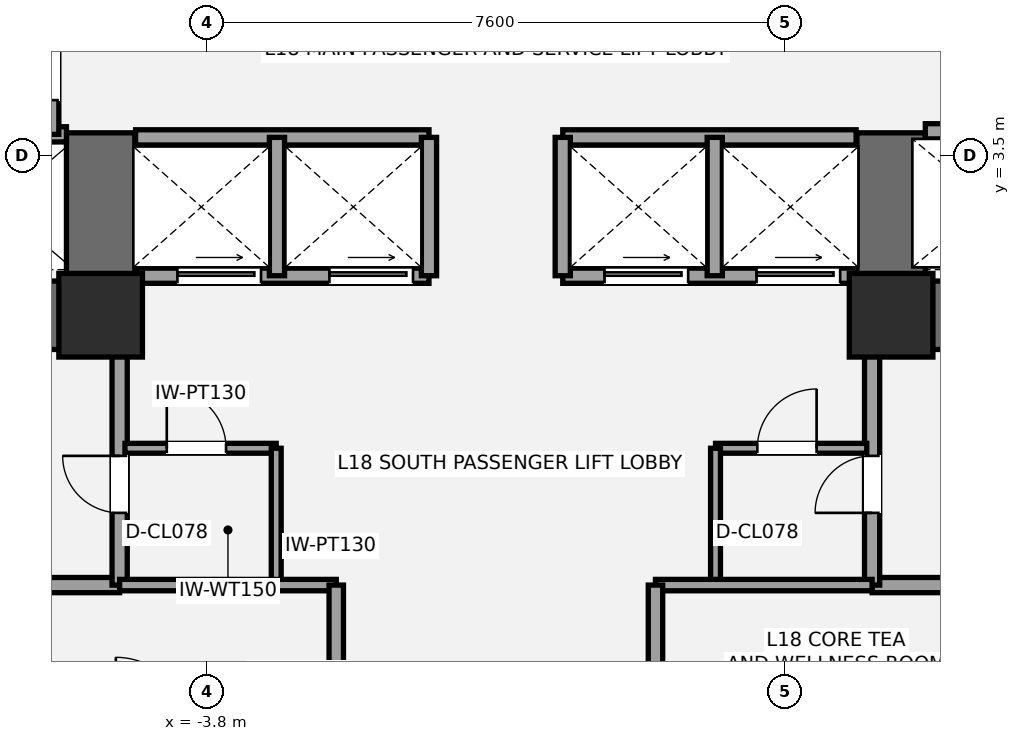
"""IFC4 building model, lengths in metres.
Left out: names, types, materials, properties, quantities, classifications, styles, units other than length and angle.
Written with IfcOpenShell. Run it as: python <this file> out.ifc"""

import sys

from ifc_helpers import new_model, si_unit, direction, frame, frame_2d, origin, origin_2d, place, context, subcontext, project, spatial, rectangle, extrude, element, fill, save


model = new_model("IFC4")
c1 = context("Model", 3, precision=1e-05, world=origin(), true_north=direction((0.0, 1.0)))
c2 = subcontext(c1, "Body", "Model", "MODEL_VIEW")
j1 = project(units=[si_unit("LENGTHUNIT", "METRE"), si_unit("PLANEANGLEUNIT", "RADIAN")], contexts=[c1])
p1 = place(None, origin())
s1 = spatial("IfcSite", under=j1, at=p1, CompositionType="ELEMENT")
p2 = place(p1, origin())
s2 = spatial("IfcBuilding", under=s1, at=p2, CompositionType="ELEMENT")
p3 = place(p2, frame((0.0, 0.0, 70.2)))
s3 = spatial("IfcBuildingStorey", under=s2, at=p3, CompositionType="ELEMENT", Elevation=70.2)
p4 = place(p3, frame((-4.75, 1.4, 0.0), z_axis=(0.0, 0.0, 1.0), x_axis=(-1.0, 0.0, 0.0)))
e1 = element("IfcWall", 1, at=p4, inside=s3, PredefinedType="SHEAR", context=c2, shape_type="SweptSolid", body=[
    extrude(rectangle(XDim=9.3, YDim=0.9, at=frame_2d((4.65, 0.0))), origin(), (0.0, 0.0, 1.0), 3.6),
])
p5 = place(p4, frame((5.55, 0.0, 0.0)))
e2 = element("IfcOpeningElement", 2, at=p5, cuts=e1, PredefinedType="OPENING", context=c2, shape_type="SweptSolid", body=[
    extrude(rectangle(XDim=1.05, YDim=2.15, at=frame_2d((0.525, 1.075))), frame((0.0, 0.46, 0.0), z_axis=(0.0, -1.0, 0.0), x_axis=(1.0, 0.0, 0.0)), (0.0, 0.0, 1.0), 0.92),
])
p6 = place(p4, frame((3.88, 0.0, 0.0)))
e3 = element("IfcOpeningElement", 3, at=p6, cuts=e1, PredefinedType="OPENING", context=c2, shape_type="SweptSolid", body=[
    extrude(rectangle(XDim=1.1, YDim=2.2, at=frame_2d((0.55, 1.1))), frame((0.0, 0.46, 0.0), z_axis=(0.0, -1.0, 0.0), x_axis=(1.0, 0.0, 0.0)), (0.0, 0.0, 1.0), 0.92),
])
p7 = place(p3, frame((-5.2, 0.95, 0.0), z_axis=(0.0, 0.0, 1.0), x_axis=(0.0, 1.0, 0.0)))
e4 = element("IfcWall", 4, at=p7, inside=s3, PredefinedType="SHEAR", context=c2, shape_type="SweptSolid", body=[
    extrude(rectangle(XDim=2.85, YDim=0.9, at=frame_2d((1.425, 0.0))), origin(), (0.0, 0.0, 1.0), 3.6),
])
p8 = place(p3, frame((14.05, 1.4, 0.0), z_axis=(0.0, 0.0, 1.0), x_axis=(-1.0, 0.0, 0.0)))
e5 = element("IfcWall", 5, at=p8, inside=s3, PredefinedType="SHEAR", context=c2, shape_type="SweptSolid", body=[
    extrude(rectangle(XDim=9.3, YDim=0.9, at=frame_2d((4.65, 0.0))), origin(), (0.0, 0.0, 1.0), 3.6),
])
p9 = place(p8, frame((2.7, 0.0, 0.0)))
e6 = element("IfcOpeningElement", 6, at=p9, cuts=e5, PredefinedType="OPENING", context=c2, shape_type="SweptSolid", body=[
    extrude(rectangle(XDim=1.05, YDim=2.15, at=frame_2d((0.525, 1.075))), frame((0.0, 0.46, 0.0), z_axis=(0.0, -1.0, 0.0), x_axis=(1.0, 0.0, 0.0)), (0.0, 0.0, 1.0), 0.92),
])
p10 = place(p8, frame((4.7, 0.0, 0.0)))
e7 = element("IfcOpeningElement", 7, at=p10, cuts=e5, PredefinedType="OPENING", context=c2, shape_type="SweptSolid", body=[
    extrude(rectangle(XDim=1.1, YDim=2.2, at=frame_2d((0.55, 1.1))), frame((0.0, 0.46, 0.0), z_axis=(0.0, -1.0, 0.0), x_axis=(1.0, 0.0, 0.0)), (0.0, 0.0, 1.0), 0.92),
])
p11 = place(p3, frame((5.2, 0.95, 0.0), z_axis=(0.0, 0.0, 1.0), x_axis=(0.0, 1.0, 0.0)))
e8 = element("IfcWall", 8, at=p11, inside=s3, PredefinedType="SHEAR", context=c2, shape_type="SweptSolid", body=[
    extrude(rectangle(XDim=2.85, YDim=0.9, at=frame_2d((1.425, 0.0))), origin(), (0.0, 0.0, 1.0), 3.6),
])
for number, where, z_axis, x_axis in (
    (9, (-5.2, 1.4, 0.0), (0.0, 0.0, 1.0), (1.0, 0.0, 0.0)),
    (10, (5.2, 1.4, 0.0), (0.0, 0.0, 1.0), (1.0, 0.0, 0.0)),
):
    element("IfcColumn", number, at=place(p3, frame(where, z_axis=z_axis, x_axis=x_axis)), inside=s3, PredefinedType="COLUMN", context=c2, shape_type="SweptSolid", body=[
        extrude(rectangle(XDim=1.1, YDim=1.1, at=origin_2d()), origin(), (0.0, 0.0, 1.0), 3.6),
    ])
p12 = place(p3, frame((-7.2, -2.15, 0.0), z_axis=(0.0, 0.0, 1.0), x_axis=(1.0, 0.0, 0.0)))
e11 = element("IfcWall", 11, at=p12, inside=s3, PredefinedType="SOLIDWALL", context=c2, shape_type="SweptSolid", body=[
    extrude(rectangle(XDim=2.25, YDim=0.2, at=frame_2d((1.125, 0.0))), origin(), (0.0, 0.0, 1.0), 3.4),
])
p13 = place(p3, frame((-4.95, -2.15, 0.0), z_axis=(0.0, 0.0, 1.0), x_axis=(0.0, 1.0, 0.0)))
e12 = element("IfcWall", 12, at=p13, inside=s3, PredefinedType="SOLIDWALL", context=c2, shape_type="SweptSolid", body=[
    extrude(rectangle(XDim=3.15, YDim=0.2, at=frame_2d((1.575, 0.0))), origin(), (0.0, 0.0, 1.0), 2.853),
])
p14 = place(p13, frame((0.95, 0.0, 0.0)))
e13 = element("IfcOpeningElement", 13, at=p14, cuts=e12, PredefinedType="OPENING", context=c2, shape_type="SweptSolid", body=[
    extrude(rectangle(XDim=0.75, YDim=2.1, at=frame_2d((0.375, 1.05))), frame((0.0, 0.11, 0.0), z_axis=(0.0, -1.0, 0.0), x_axis=(1.0, 0.0, 0.0)), (0.0, 0.0, 1.0), 0.22),
])
p15 = place(p3, frame((4.95, -2.15, 0.0), z_axis=(0.0, 0.0, 1.0), x_axis=(1.0, 0.0, 0.0)))
e14 = element("IfcWall", 14, at=p15, inside=s3, PredefinedType="SOLIDWALL", context=c2, shape_type="SweptSolid", body=[
    extrude(rectangle(XDim=2.25, YDim=0.2, at=frame_2d((1.125, 0.0))), origin(), (0.0, 0.0, 1.0), 3.4),
])
p16 = place(p3, frame((4.95, -2.15, 0.0), z_axis=(0.0, 0.0, 1.0), x_axis=(0.0, 1.0, 0.0)))
e15 = element("IfcWall", 15, at=p16, inside=s3, PredefinedType="SOLIDWALL", context=c2, shape_type="SweptSolid", body=[
    extrude(rectangle(XDim=3.15, YDim=0.2, at=frame_2d((1.575, 0.0))), origin(), (0.0, 0.0, 1.0), 2.853),
])
p17 = place(p16, frame((0.95, 0.0, 0.0)))
e16 = element("IfcOpeningElement", 16, at=p17, cuts=e15, PredefinedType="OPENING", context=c2, shape_type="SweptSolid", body=[
    extrude(rectangle(XDim=0.75, YDim=2.1, at=frame_2d((0.375, 1.05))), frame((0.0, 0.11, 0.0), z_axis=(0.0, -1.0, 0.0), x_axis=(1.0, 0.0, 0.0)), (0.0, 0.0, 1.0), 0.22),
])
p18 = place(p3, frame((-4.88, -0.35, 0.0), z_axis=(0.0, 0.0, 1.0), x_axis=(1.0, 0.0, 0.0)))
e17 = element("IfcWall", 17, at=p18, inside=s3, PredefinedType="PARTITIONING", context=c2, shape_type="SweptSolid", body=[
    extrude(rectangle(XDim=1.99, YDim=0.13, at=frame_2d((0.995, 0.0))), origin(), (0.0, 0.0, 1.0), 3.4),
])
p19 = place(p18, frame((0.55, 0.0, 0.0)))
e18 = element("IfcOpeningElement", 18, at=p19, cuts=e17, PredefinedType="OPENING", context=c2, shape_type="SweptSolid", body=[
    extrude(rectangle(XDim=0.78, YDim=2.1, at=frame_2d((0.39, 1.05))), frame((0.0, 0.075, 0.0), z_axis=(0.0, -1.0, 0.0), x_axis=(1.0, 0.0, 0.0)), (0.0, 0.0, 1.0), 0.15),
])
p20 = place(p3, frame((-2.89, -2.15, 0.0), z_axis=(0.0, 0.0, 1.0), x_axis=(0.0, 1.0, 0.0)))
e19 = element("IfcWall", 19, at=p20, inside=s3, PredefinedType="PARTITIONING", context=c2, shape_type="SweptSolid", body=[
    extrude(rectangle(XDim=1.8, YDim=0.13, at=frame_2d((0.9, 0.0))), origin(), (0.0, 0.0, 1.0), 3.4),
])
p21 = place(p3, frame((2.89, -0.35, 0.0), z_axis=(0.0, 0.0, 1.0), x_axis=(1.0, 0.0, 0.0)))
e20 = element("IfcWall", 20, at=p21, inside=s3, PredefinedType="PARTITIONING", context=c2, shape_type="SweptSolid", body=[
    extrude(rectangle(XDim=1.99, YDim=0.13, at=frame_2d((0.995, 0.0))), origin(), (0.0, 0.0, 1.0), 3.4),
])
p22 = place(p21, frame((0.55, 0.0, 0.0)))
e21 = element("IfcOpeningElement", 21, at=p22, cuts=e20, PredefinedType="OPENING", context=c2, shape_type="SweptSolid", body=[
    extrude(rectangle(XDim=0.78, YDim=2.1, at=frame_2d((0.39, 1.05))), frame((0.0, 0.075, 0.0), z_axis=(0.0, -1.0, 0.0), x_axis=(1.0, 0.0, 0.0)), (0.0, 0.0, 1.0), 0.15),
])
p23 = place(p3, frame((2.89, -2.15, 0.0), z_axis=(0.0, 0.0, 1.0), x_axis=(0.0, 1.0, 0.0)))
e22 = element("IfcWall", 22, at=p23, inside=s3, PredefinedType="PARTITIONING", context=c2, shape_type="SweptSolid", body=[
    extrude(rectangle(XDim=1.8, YDim=0.13, at=frame_2d((0.9, 0.0))), origin(), (0.0, 0.0, 1.0), 3.4),
])
p24 = place(p3, frame((-9.78, 3.78, 0.0), z_axis=(0.0, 0.0, 1.0), x_axis=(1.0, 0.0, 0.0)))
e23 = element("IfcWall", 23, at=p24, inside=s3, PredefinedType="SOLIDWALL", context=c2, shape_type="SweptSolid", body=[
    extrude(rectangle(XDim=4.13, YDim=0.2, at=frame_2d((2.065, 0.0))), origin(), (0.0, 0.0, 1.0), 3.4),
])
p25 = place(p3, frame((-5.85, 3.78, 0.0), z_axis=(0.0, 0.0, 1.0), x_axis=(0.0, 1.0, 0.0)))
e24 = element("IfcWall", 24, at=p25, inside=s3, PredefinedType="SOLIDWALL", context=c2, shape_type="SweptSolid", body=[
    extrude(rectangle(XDim=1.69, YDim=0.2, at=frame_2d((0.845, 0.0))), origin(), (0.0, 0.0, 1.0), 3.4),
])
p26 = place(p25, frame((0.45, 0.0, 0.0)))
e25 = element("IfcOpeningElement", 25, at=p26, cuts=e24, PredefinedType="OPENING", context=c2, shape_type="SweptSolid", body=[
    extrude(rectangle(XDim=0.75, YDim=2.1, at=frame_2d((0.375, 1.05))), frame((0.0, 0.11, 0.0), z_axis=(0.0, -1.0, 0.0), x_axis=(1.0, 0.0, 0.0)), (0.0, 0.0, 1.0), 0.22),
])
p27 = place(p3, frame((5.65, 3.82, 0.0), z_axis=(0.0, 0.0, 1.0), x_axis=(1.0, 0.0, 0.0)))
e26 = element("IfcWall", 26, at=p27, inside=s3, PredefinedType="SOLIDWALL", context=c2, shape_type="SweptSolid", body=[
    extrude(rectangle(XDim=4.13, YDim=0.2, at=frame_2d((2.065, 0.0))), origin(), (0.0, 0.0, 1.0), 3.4),
])
p28 = place(p27, frame((0.65, 0.0, 0.0)))
e27 = element("IfcOpeningElement", 27, at=p28, cuts=e26, PredefinedType="OPENING", context=c2, shape_type="SweptSolid", body=[
    extrude(rectangle(XDim=1.2, YDim=2.2, at=frame_2d((0.6, 1.1))), frame((0.0, 0.11, 0.0), z_axis=(0.0, -1.0, 0.0), x_axis=(1.0, 0.0, 0.0)), (0.0, 0.0, 1.0), 0.22),
])
p29 = place(p3, frame((-4.74, 1.92, 0.0), z_axis=(0.0, 0.0, 1.0), x_axis=(1.0, 0.0, 0.0)))
e28 = element("IfcWall", 28, at=p29, inside=s3, PredefinedType="SOLIDWALL", context=c2, shape_type="SweptSolid", body=[
    extrude(rectangle(XDim=3.86, YDim=0.2, at=frame_2d((1.93, 0.0))), origin(), (0.0, 0.0, 1.0), 2.39),
])
p30 = place(p29, frame((0.55, 0.0, 0.0)))
e29 = element("IfcOpeningElement", 29, at=p30, cuts=e28, PredefinedType="OPENING", context=c2, shape_type="SweptSolid", body=[
    extrude(rectangle(XDim=1.1, YDim=2.2, at=frame_2d((0.55, 1.1))), frame((0.0, 0.11, 0.0), z_axis=(0.0, -1.0, 0.0), x_axis=(1.0, 0.0, 0.0)), (0.0, 0.0, 1.0), 0.22),
])
p31 = place(p29, frame((2.55, 0.0, 0.0)))
e30 = element("IfcOpeningElement", 30, at=p31, cuts=e28, PredefinedType="OPENING", context=c2, shape_type="SweptSolid", body=[
    extrude(rectangle(XDim=1.1, YDim=2.2, at=frame_2d((0.55, 1.1))), frame((0.0, 0.11, 0.0), z_axis=(0.0, -1.0, 0.0), x_axis=(1.0, 0.0, 0.0)), (0.0, 0.0, 1.0), 0.22),
])
p32 = place(p3, frame((0.88, 1.92, 0.0), z_axis=(0.0, 0.0, 1.0), x_axis=(1.0, 0.0, 0.0)))
e31 = element("IfcWall", 31, at=p32, inside=s3, PredefinedType="SOLIDWALL", context=c2, shape_type="SweptSolid", body=[
    extrude(rectangle(XDim=3.86, YDim=0.2, at=frame_2d((1.93, 0.0))), origin(), (0.0, 0.0, 1.0), 2.39),
])
p33 = place(p32, frame((0.55, 0.0, 0.0)))
e32 = element("IfcOpeningElement", 32, at=p33, cuts=e31, PredefinedType="OPENING", context=c2, shape_type="SweptSolid", body=[
    extrude(rectangle(XDim=1.1, YDim=2.2, at=frame_2d((0.55, 1.1))), frame((0.0, 0.11, 0.0), z_axis=(0.0, -1.0, 0.0), x_axis=(1.0, 0.0, 0.0)), (0.0, 0.0, 1.0), 0.22),
])
p34 = place(p32, frame((2.55, 0.0, 0.0)))
e33 = element("IfcOpeningElement", 33, at=p34, cuts=e31, PredefinedType="OPENING", context=c2, shape_type="SweptSolid", body=[
    extrude(rectangle(XDim=1.1, YDim=2.2, at=frame_2d((0.55, 1.1))), frame((0.0, 0.11, 0.0), z_axis=(0.0, -1.0, 0.0), x_axis=(1.0, 0.0, 0.0)), (0.0, 0.0, 1.0), 0.22),
])
for number, where, z_axis, x_axis in (
    (34, (-4.74, 3.74, 0.0), (0.0, 0.0, 1.0), (1.0, 0.0, 0.0)),
    (35, (0.88, 3.74, 0.0), (0.0, 0.0, 1.0), (1.0, 0.0, 0.0)),
):
    element("IfcWall", number, at=place(p3, frame(where, z_axis=z_axis, x_axis=x_axis)), inside=s3, PredefinedType="SOLIDWALL", context=c2, shape_type="SweptSolid", body=[
        extrude(rectangle(XDim=3.86, YDim=0.2, at=frame_2d((1.93, 0.0))), origin(), (0.0, 0.0, 1.0), 3.4),
    ])
for number, where, z_axis, x_axis in (
    (36, (-2.88, 1.92, 0.0), (0.0, 0.0, 1.0), (0.0, 1.0, 0.0)),
    (37, (2.88, 1.92, 0.0), (0.0, 0.0, 1.0), (0.0, 1.0, 0.0)),
    (38, (-0.88, 1.92, 0.0), (0.0, 0.0, 1.0), (0.0, 1.0, 0.0)),
    (39, (0.88, 1.92, 0.0), (0.0, 0.0, 1.0), (0.0, 1.0, 0.0)),
):
    element("IfcWall", number, at=place(p3, frame(where, z_axis=z_axis, x_axis=x_axis)), inside=s3, PredefinedType="SOLIDWALL", context=c2, shape_type="SweptSolid", body=[
        extrude(rectangle(XDim=1.82, YDim=0.2, at=frame_2d((0.91, 0.0))), origin(), (0.0, 0.0, 1.0), 3.4),
    ])
p35 = place(p3, frame((-4.95, -2.15, 0.0), z_axis=(0.0, 0.0, 1.0), x_axis=(1.0, 0.0, 0.0)))
e40 = element("IfcWall", 40, at=p35, inside=s3, PredefinedType="PLUMBINGWALL", context=c2, shape_type="SweptSolid", body=[
    extrude(rectangle(XDim=2.85, YDim=0.15, at=frame_2d((1.425, 0.0))), origin(), (0.0, 0.0, 1.0), 3.4),
])
p36 = place(p3, frame((-2.1, -4.05, 0.0), z_axis=(0.0, 0.0, 1.0), x_axis=(0.0, 1.0, 0.0)))
e41 = element("IfcWall", 41, at=p36, inside=s3, PredefinedType="PLUMBINGWALL", context=c2, shape_type="SweptSolid", body=[
    extrude(rectangle(XDim=1.9, YDim=0.19, at=frame_2d((0.95, 0.0))), origin(), (0.0, 0.0, 1.0), 3.4),
])
p37 = place(p3, frame((2.1, -2.15, 0.0), z_axis=(0.0, 0.0, 1.0), x_axis=(1.0, 0.0, 0.0)))
e42 = element("IfcWall", 42, at=p37, inside=s3, PredefinedType="PLUMBINGWALL", context=c2, shape_type="SweptSolid", body=[
    extrude(rectangle(XDim=2.85, YDim=0.15, at=frame_2d((1.425, 0.0))), origin(), (0.0, 0.0, 1.0), 3.4),
])
p38 = place(p3, frame((2.1, -4.05, 0.0), z_axis=(0.0, 0.0, 1.0), x_axis=(0.0, 1.0, 0.0)))
e43 = element("IfcWall", 43, at=p38, inside=s3, PredefinedType="PLUMBINGWALL", context=c2, shape_type="SweptSolid", body=[
    extrude(rectangle(XDim=1.9, YDim=0.19, at=frame_2d((0.95, 0.0))), origin(), (0.0, 0.0, 1.0), 3.4),
])
p39 = place(p14, origin())
e44 = element("IfcDoor", 44, at=p39, inside=s3, OperationType="SINGLE_SWING_RIGHT", PredefinedType="DOOR", context=c2, shape_type="SweptSolid", body=[
    extrude(rectangle(XDim=0.75, YDim=2.1, at=frame_2d((0.375, 1.05))), frame((0.0, 0.025, 0.0), z_axis=(0.0, -1.0, 0.0), x_axis=(1.0, 0.0, 0.0)), (0.0, 0.0, 1.0), 0.05),
])
fill(e13, e44)
p40 = place(p17, origin())
e45 = element("IfcDoor", 45, at=p40, inside=s3, OperationType="SINGLE_SWING_LEFT", PredefinedType="DOOR", context=c2, shape_type="SweptSolid", body=[
    extrude(rectangle(XDim=0.75, YDim=2.1, at=frame_2d((0.375, 1.05))), frame((0.0, 0.025, 0.0), z_axis=(0.0, -1.0, 0.0), x_axis=(1.0, 0.0, 0.0)), (0.0, 0.0, 1.0), 0.05),
])
fill(e16, e45)
p41 = place(p19, origin())
e46 = element("IfcDoor", 46, at=p41, inside=s3, OperationType="SINGLE_SWING_LEFT", PredefinedType="DOOR", context=c2, shape_type="SweptSolid", body=[
    extrude(rectangle(XDim=0.78, YDim=2.1, at=frame_2d((0.39, 1.05))), frame((0.0, 0.025, 0.0), z_axis=(0.0, -1.0, 0.0), x_axis=(1.0, 0.0, 0.0)), (0.0, 0.0, 1.0), 0.05),
])
fill(e18, e46)
p42 = place(p22, origin())
e47 = element("IfcDoor", 47, at=p42, inside=s3, OperationType="SINGLE_SWING_RIGHT", PredefinedType="DOOR", context=c2, shape_type="SweptSolid", body=[
    extrude(rectangle(XDim=0.78, YDim=2.1, at=frame_2d((0.39, 1.05))), frame((0.0, 0.025, 0.0), z_axis=(0.0, -1.0, 0.0), x_axis=(1.0, 0.0, 0.0)), (0.0, 0.0, 1.0), 0.05),
])
fill(e21, e47)
p43 = place(p26, origin())
e48 = element("IfcDoor", 48, at=p43, inside=s3, OperationType="SINGLE_SWING_RIGHT", PredefinedType="DOOR", context=c2, shape_type="SweptSolid", body=[
    extrude(rectangle(XDim=0.75, YDim=2.1, at=frame_2d((0.375, 1.05))), frame((0.0, 0.025, 0.0), z_axis=(0.0, -1.0, 0.0), x_axis=(1.0, 0.0, 0.0)), (0.0, 0.0, 1.0), 0.05),
])
fill(e25, e48)
p44 = place(p30, origin())
e49 = element("IfcDoor", 49, at=p44, inside=s3, OperationType="SLIDING_TO_LEFT", PredefinedType="DOOR", context=c2, shape_type="SweptSolid", body=[
    extrude(rectangle(XDim=1.1, YDim=2.2, at=frame_2d((0.55, 1.1))), frame((0.0, 0.025, 0.0), z_axis=(0.0, -1.0, 0.0), x_axis=(1.0, 0.0, 0.0)), (0.0, 0.0, 1.0), 0.05),
])
fill(e29, e49)
p45 = place(p31, origin())
e50 = element("IfcDoor", 50, at=p45, inside=s3, OperationType="SLIDING_TO_LEFT", PredefinedType="DOOR", context=c2, shape_type="SweptSolid", body=[
    extrude(rectangle(XDim=1.1, YDim=2.2, at=frame_2d((0.55, 1.1))), frame((0.0, 0.025, 0.0), z_axis=(0.0, -1.0, 0.0), x_axis=(1.0, 0.0, 0.0)), (0.0, 0.0, 1.0), 0.05),
])
fill(e30, e50)
p46 = place(p33, origin())
e51 = element("IfcDoor", 51, at=p46, inside=s3, OperationType="SLIDING_TO_LEFT", PredefinedType="DOOR", context=c2, shape_type="SweptSolid", body=[
    extrude(rectangle(XDim=1.1, YDim=2.2, at=frame_2d((0.55, 1.1))), frame((0.0, 0.025, 0.0), z_axis=(0.0, -1.0, 0.0), x_axis=(1.0, 0.0, 0.0)), (0.0, 0.0, 1.0), 0.05),
])
fill(e32, e51)
p47 = place(p34, origin())
e52 = element("IfcDoor", 52, at=p47, inside=s3, OperationType="SLIDING_TO_LEFT", PredefinedType="DOOR", context=c2, shape_type="SweptSolid", body=[
    extrude(rectangle(XDim=1.1, YDim=2.2, at=frame_2d((0.55, 1.1))), frame((0.0, 0.025, 0.0), z_axis=(0.0, -1.0, 0.0), x_axis=(1.0, 0.0, 0.0)), (0.0, 0.0, 1.0), 0.05),
])
fill(e33, e52)
save(model, sys.argv[1])
